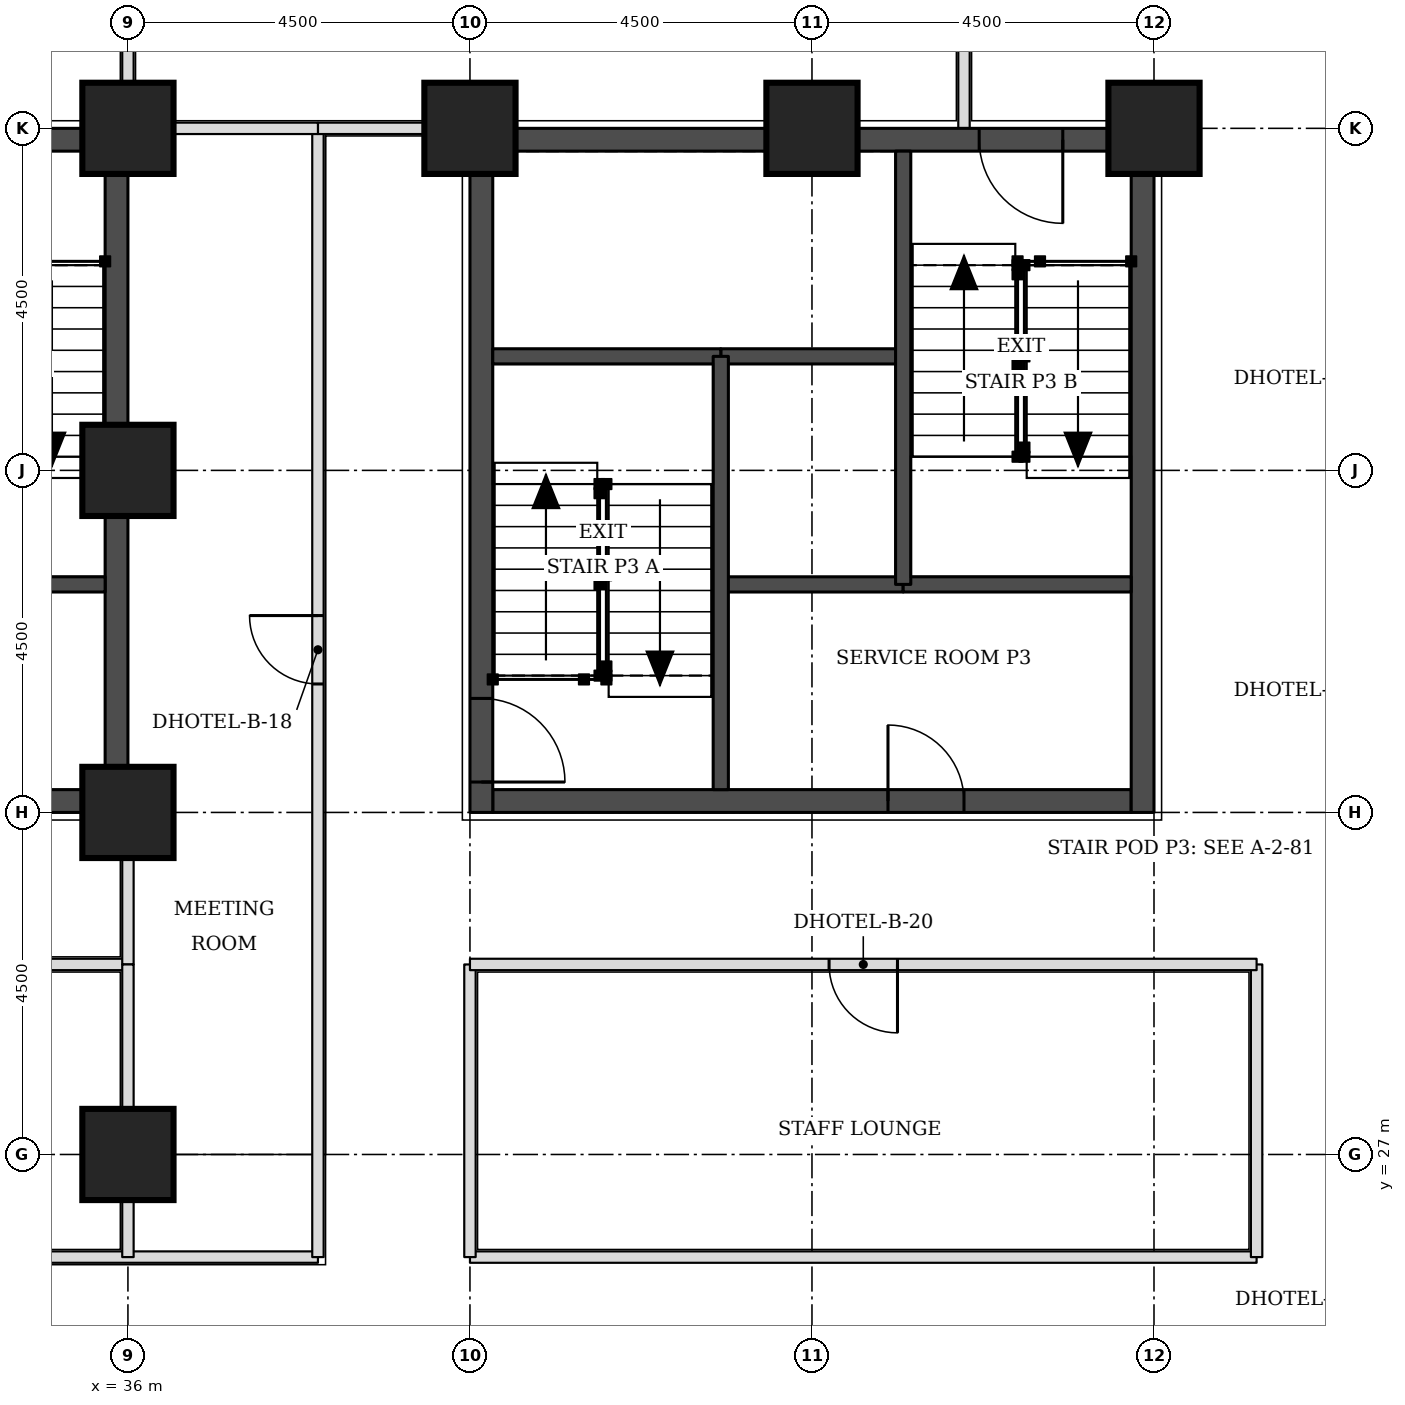
"""IFC4 building model, lengths in metres.
Left out: names, types, materials, properties, quantities, classifications, styles, units other than length and angle.
Written with IfcOpenShell. Run it as: python <this file> out.ifc"""

import sys

from ifc_helpers import new_model, si_unit, direction, frame, frame_2d, origin, origin_2d, place, context, subcontext, project, spatial, rectangle, extrude, element, fill, save


model = new_model("IFC4")
c1 = context("Model", 3, precision=1e-05, world=origin(), true_north=direction((0.0, 1.0)))
c2 = subcontext(c1, "Body", "Model", "MODEL_VIEW")
j1 = project(units=[si_unit("LENGTHUNIT", "METRE"), si_unit("PLANEANGLEUNIT", "RADIAN")], contexts=[c1])
p1 = place(None, origin())
s1 = spatial("IfcSite", under=j1, at=p1, CompositionType="ELEMENT")
p2 = place(p1, origin())
s2 = spatial("IfcBuilding", under=s1, at=p2, CompositionType="ELEMENT")
p3 = place(p2, frame((0.0, 0.0, 52.8)))
s3 = spatial("IfcBuildingStorey", under=s2, at=p3, CompositionType="ELEMENT", Elevation=52.8)
for number, where, z_axis, x_axis in (
    (1, (36.0, 27.0, 0.0), (0.0, 0.0, 1.0), (1.0, 0.0, 0.0)),
    (2, (36.0, 31.5, 0.0), (0.0, 0.0, 1.0), (1.0, 0.0, 0.0)),
    (3, (36.0, 36.0, 0.0), (0.0, 0.0, 1.0), (1.0, 0.0, 0.0)),
    (4, (36.0, 40.5, 0.0), (0.0, 0.0, 1.0), (1.0, 0.0, 0.0)),
    (5, (40.5, 40.5, 0.0), (0.0, 0.0, 1.0), (1.0, 0.0, 0.0)),
    (6, (45.0, 40.5, 0.0), (0.0, 0.0, 1.0), (1.0, 0.0, 0.0)),
    (7, (49.5, 40.5, 0.0), (0.0, 0.0, 1.0), (1.0, 0.0, 0.0)),
):
    element("IfcColumn", number, at=place(p3, frame(where, z_axis=z_axis, x_axis=x_axis)), inside=s3, PredefinedType="COLUMN", context=c2, shape_type="SweptSolid", body=[
        extrude(rectangle(XDim=1.2, YDim=1.2, at=origin_2d()), origin(), (0.0, 0.0, 1.0), 3.3),
    ])
p4 = place(p3, frame((40.8, 31.65, 0.0), z_axis=(0.0, 0.0, 1.0), x_axis=(1.0, 0.0, 0.0)))
e8 = element("IfcWall", 8, at=p4, inside=s3, PredefinedType="SHEAR", context=c2, shape_type="SweptSolid", body=[
    extrude(rectangle(XDim=8.4, YDim=0.3, at=frame_2d((4.2, 0.0))), origin(), (0.0, 0.0, 1.0), 3.3),
])
p5 = place(p4, frame((5.2, 0.0, 0.0)))
e9 = element("IfcOpeningElement", 9, at=p5, cuts=e8, PredefinedType="OPENING", context=c2, shape_type="SweptSolid", body=[
    extrude(rectangle(XDim=1.0, YDim=2.1, at=frame_2d((0.5, 1.05))), frame((0.0, 0.16, 0.0), z_axis=(0.0, -1.0, 0.0), x_axis=(1.0, 0.0, 0.0)), (0.0, 0.0, 1.0), 0.32),
])
p6 = place(p3, frame((40.8, 40.35, 0.0), z_axis=(0.0, 0.0, 1.0), x_axis=(1.0, 0.0, 0.0)))
e10 = element("IfcWall", 10, at=p6, inside=s3, PredefinedType="SHEAR", context=c2, shape_type="SweptSolid", body=[
    extrude(rectangle(XDim=8.4, YDim=0.3, at=frame_2d((4.2, 0.0))), origin(), (0.0, 0.0, 1.0), 3.3),
])
p7 = place(p6, frame((6.4, 0.0, 0.0)))
e11 = element("IfcOpeningElement", 11, at=p7, cuts=e10, PredefinedType="OPENING", context=c2, shape_type="SweptSolid", body=[
    extrude(rectangle(XDim=1.1, YDim=2.1, at=frame_2d((0.55, 1.05))), frame((0.0, 0.16, 0.0), z_axis=(0.0, -1.0, 0.0), x_axis=(1.0, 0.0, 0.0)), (0.0, 0.0, 1.0), 0.32),
])
p8 = place(p3, frame((40.65, 31.5, 0.0), z_axis=(0.0, 0.0, 1.0), x_axis=(0.0, 1.0, 0.0)))
e12 = element("IfcWall", 12, at=p8, inside=s3, PredefinedType="SHEAR", context=c2, shape_type="SweptSolid", body=[
    extrude(rectangle(XDim=9.0, YDim=0.3, at=frame_2d((4.5, 0.0))), origin(), (0.0, 0.0, 1.0), 3.3),
])
p9 = place(p8, frame((0.4, 0.0, 0.0)))
e13 = element("IfcOpeningElement", 13, at=p9, cuts=e12, PredefinedType="OPENING", context=c2, shape_type="SweptSolid", body=[
    extrude(rectangle(XDim=1.1, YDim=2.1, at=frame_2d((0.55, 1.05))), frame((0.0, 0.16, 0.0), z_axis=(0.0, -1.0, 0.0), x_axis=(1.0, 0.0, 0.0)), (0.0, 0.0, 1.0), 0.32),
])
p10 = place(p3, frame((49.35, 31.5, 0.0), z_axis=(0.0, 0.0, 1.0), x_axis=(0.0, 1.0, 0.0)))
e14 = element("IfcWall", 14, at=p10, inside=s3, PredefinedType="SHEAR", context=c2, shape_type="SweptSolid", body=[
    extrude(rectangle(XDim=9.0, YDim=0.3, at=frame_2d((4.5, 0.0))), origin(), (0.0, 0.0, 1.0), 3.3),
])
p11 = place(p3, frame((27.3, 31.65, 0.0), z_axis=(0.0, 0.0, 1.0), x_axis=(1.0, 0.0, 0.0)))
e15 = element("IfcWall", 15, at=p11, inside=s3, PredefinedType="SHEAR", context=c2, shape_type="SweptSolid", body=[
    extrude(rectangle(XDim=8.4, YDim=0.3, at=frame_2d((4.2, 0.0))), origin(), (0.0, 0.0, 1.0), 3.3),
])
p12 = place(p11, frame((4.8, 0.0, 0.0)))
e16 = element("IfcOpeningElement", 16, at=p12, cuts=e15, PredefinedType="OPENING", context=c2, shape_type="SweptSolid", body=[
    extrude(rectangle(XDim=1.8, YDim=2.1, at=frame_2d((0.9, 1.05))), frame((0.0, 0.16, 0.0), z_axis=(0.0, -1.0, 0.0), x_axis=(1.0, 0.0, 0.0)), (0.0, 0.0, 1.0), 0.32),
])
p13 = place(p3, frame((27.3, 40.35, 0.0), z_axis=(0.0, 0.0, 1.0), x_axis=(1.0, 0.0, 0.0)))
e17 = element("IfcWall", 17, at=p13, inside=s3, PredefinedType="SHEAR", context=c2, shape_type="SweptSolid", body=[
    extrude(rectangle(XDim=8.4, YDim=0.3, at=frame_2d((4.2, 0.0))), origin(), (0.0, 0.0, 1.0), 3.3),
])
p14 = place(p13, frame((6.4, 0.0, 0.0)))
e18 = element("IfcOpeningElement", 18, at=p14, cuts=e17, PredefinedType="OPENING", context=c2, shape_type="SweptSolid", body=[
    extrude(rectangle(XDim=1.1, YDim=2.1, at=frame_2d((0.55, 1.05))), frame((0.0, 0.16, 0.0), z_axis=(0.0, -1.0, 0.0), x_axis=(1.0, 0.0, 0.0)), (0.0, 0.0, 1.0), 0.32),
])
p15 = place(p3, frame((35.85, 31.5, 0.0), z_axis=(0.0, 0.0, 1.0), x_axis=(0.0, 1.0, 0.0)))
e19 = element("IfcWall", 19, at=p15, inside=s3, PredefinedType="SHEAR", context=c2, shape_type="SweptSolid", body=[
    extrude(rectangle(XDim=9.0, YDim=0.3, at=frame_2d((4.5, 0.0))), origin(), (0.0, 0.0, 1.0), 3.3),
])
p16 = place(p3, frame((27.0, 25.65, 0.0), z_axis=(0.0, 0.0, 1.0), x_axis=(1.0, 0.0, 0.0)))
e20 = element("IfcWall", 20, at=p16, inside=s3, PredefinedType="PARTITIONING", context=c2, shape_type="SweptSolid", body=[
    extrude(rectangle(XDim=11.5, YDim=0.15, at=frame_2d((5.75, 0.0))), origin(), (0.0, 0.0, 1.0), 3.08),
])
p17 = place(p3, frame((38.5, 25.65, 0.0), z_axis=(0.0, 0.0, 1.0), x_axis=(0.0, 1.0, 0.0)))
e21 = element("IfcWall", 21, at=p17, inside=s3, PredefinedType="PARTITIONING", context=c2, shape_type="SweptSolid", body=[
    extrude(rectangle(XDim=14.85, YDim=0.15, at=frame_2d((7.425, 0.0))), origin(), (0.0, 0.0, 1.0), 3.08),
])
p18 = place(p17, frame((7.54, 0.0, 0.0)))
e22 = element("IfcOpeningElement", 22, at=p18, cuts=e21, PredefinedType="OPENING", context=c2, shape_type="SweptSolid", body=[
    extrude(rectangle(XDim=0.9, YDim=2.1, at=frame_2d((0.45, 1.05))), frame((0.0, 0.085, 0.0), z_axis=(0.0, -1.0, 0.0), x_axis=(1.0, 0.0, 0.0)), (0.0, 0.0, 1.0), 0.17),
])
p19 = place(p3, frame((40.5, 25.65, 0.0), z_axis=(0.0, 0.0, 1.0), x_axis=(1.0, 0.0, 0.0)))
e23 = element("IfcWall", 23, at=p19, inside=s3, PredefinedType="PARTITIONING", context=c2, shape_type="SweptSolid", body=[
    extrude(rectangle(XDim=10.35, YDim=0.15, at=frame_2d((5.175, 0.0))), origin(), (0.0, 0.0, 1.0), 3.08),
])
for number, where, z_axis, x_axis in (
    (24, (40.5, 25.65, 0.0), (0.0, 0.0, 1.0), (0.0, 1.0, 0.0)),
    (25, (50.85, 25.65, 0.0), (0.0, 0.0, 1.0), (0.0, 1.0, 0.0)),
):
    element("IfcWall", number, at=place(p3, frame(where, z_axis=z_axis, x_axis=x_axis)), inside=s3, PredefinedType="PARTITIONING", context=c2, shape_type="SweptSolid", body=[
        extrude(rectangle(XDim=3.85, YDim=0.15, at=frame_2d((1.925, 0.0))), origin(), (0.0, 0.0, 1.0), 3.08),
    ])
p20 = place(p3, frame((27.0, 29.5, 0.0), z_axis=(0.0, 0.0, 1.0), x_axis=(1.0, 0.0, 0.0)))
e26 = element("IfcWall", 26, at=p20, inside=s3, PredefinedType="PARTITIONING", context=c2, shape_type="SweptSolid", body=[
    extrude(rectangle(XDim=9.0, YDim=0.15, at=frame_2d((4.5, 0.0))), origin(), (0.0, 0.0, 1.0), 3.08),
])
p21 = place(p20, frame((4.05, 0.0, 0.0)))
e27 = element("IfcOpeningElement", 27, at=p21, cuts=e26, PredefinedType="OPENING", context=c2, shape_type="SweptSolid", body=[
    extrude(rectangle(XDim=0.9, YDim=2.1, at=frame_2d((0.45, 1.05))), frame((0.0, 0.085, 0.0), z_axis=(0.0, -1.0, 0.0), x_axis=(1.0, 0.0, 0.0)), (0.0, 0.0, 1.0), 0.17),
])
p22 = place(p3, frame((36.0, 29.5, 0.0), z_axis=(0.0, 0.0, 1.0), x_axis=(0.0, 1.0, 0.0)))
e28 = element("IfcWall", 28, at=p22, inside=s3, PredefinedType="PARTITIONING", context=c2, shape_type="SweptSolid", body=[
    extrude(rectangle(XDim=1.95, YDim=0.15, at=frame_2d((0.975, 0.0))), origin(), (0.0, 0.0, 1.0), 2.33),
])
p23 = place(p3, frame((40.5, 29.5, 0.0), z_axis=(0.0, 0.0, 1.0), x_axis=(1.0, 0.0, 0.0)))
e29 = element("IfcWall", 29, at=p23, inside=s3, PredefinedType="PARTITIONING", context=c2, shape_type="SweptSolid", body=[
    extrude(rectangle(XDim=10.35, YDim=0.15, at=frame_2d((5.175, 0.0))), origin(), (0.0, 0.0, 1.0), 3.08),
])
p24 = place(p23, frame((4.725, 0.0, 0.0)))
e30 = element("IfcOpeningElement", 30, at=p24, cuts=e29, PredefinedType="OPENING", context=c2, shape_type="SweptSolid", body=[
    extrude(rectangle(XDim=0.9, YDim=2.1, at=frame_2d((0.45, 1.05))), frame((0.0, 0.085, 0.0), z_axis=(0.0, -1.0, 0.0), x_axis=(1.0, 0.0, 0.0)), (0.0, 0.0, 1.0), 0.17),
])
p25 = place(p3, frame((38.5, 40.5, 0.0), z_axis=(0.0, 0.0, 1.0), x_axis=(1.0, 0.0, 0.0)))
e31 = element("IfcWall", 31, at=p25, inside=s3, PredefinedType="PARTITIONING", context=c2, shape_type="SweptSolid", body=[
    extrude(rectangle(XDim=1.95, YDim=0.15, at=frame_2d((0.975, 0.0))), origin(), (0.0, 0.0, 1.0), 2.33),
])
p26 = place(p3, frame((36.0, 40.55, 0.0), z_axis=(0.0, 0.0, 1.0), x_axis=(0.0, 1.0, 0.0)))
e32 = element("IfcWall", 32, at=p26, inside=s3, PredefinedType="PARTITIONING", context=c2, shape_type="SweptSolid", body=[
    extrude(rectangle(XDim=4.4, YDim=0.15, at=frame_2d((2.2, 0.0))), origin(), (0.0, 0.0, 1.0), 2.33),
])
p27 = place(p3, frame((47.0, 40.5, 0.0), z_axis=(0.0, 0.0, 1.0), x_axis=(0.0, 1.0, 0.0)))
e33 = element("IfcWall", 33, at=p27, inside=s3, PredefinedType="PARTITIONING", context=c2, shape_type="SweptSolid", body=[
    extrude(rectangle(XDim=7.0, YDim=0.15, at=frame_2d((3.5, 0.0))), origin(), (0.0, 0.0, 1.0), 3.08),
])
p28 = place(p27, frame((3.05, 0.0, 0.0)))
e34 = element("IfcOpeningElement", 34, at=p28, cuts=e33, PredefinedType="OPENING", context=c2, shape_type="SweptSolid", body=[
    extrude(rectangle(XDim=0.9, YDim=2.1, at=frame_2d((0.45, 1.05))), frame((0.0, 0.085, 0.0), z_axis=(0.0, -1.0, 0.0), x_axis=(1.0, 0.0, 0.0)), (0.0, 0.0, 1.0), 0.17),
])
p29 = place(p3, frame((36.0, 25.65, 0.0), z_axis=(0.0, 0.0, 1.0), x_axis=(0.0, 1.0, 0.0)))
e35 = element("IfcWall", 35, at=p29, inside=s3, PredefinedType="PARTITIONING", context=c2, shape_type="SweptSolid", body=[
    extrude(rectangle(XDim=3.85, YDim=0.15, at=frame_2d((1.925, 0.0))), origin(), (0.0, 0.0, 1.0), 2.33),
])
p30 = place(p3, frame((36.05, 40.5, 0.0), z_axis=(0.0, 0.0, 1.0), x_axis=(1.0, 0.0, 0.0)))
e36 = element("IfcWall", 36, at=p30, inside=s3, PredefinedType="PARTITIONING", context=c2, shape_type="SweptSolid", body=[
    extrude(rectangle(XDim=2.45, YDim=0.15, at=frame_2d((1.225, 0.0))), origin(), (0.0, 0.0, 1.0), 2.33),
])
p31 = place(p3, frame((43.8, 34.5, 0.0), z_axis=(0.0, 0.0, 1.0), x_axis=(1.0, 0.0, 0.0)))
e37 = element("IfcWall", 37, at=p31, inside=s3, PredefinedType="SOLIDWALL", context=c2, shape_type="SweptSolid", body=[
    extrude(rectangle(XDim=2.4, YDim=0.2, at=frame_2d((1.2, 0.0))), origin(), (0.0, 0.0, 1.0), 3.08),
])
p32 = place(p3, frame((46.2, 34.5, 0.0), z_axis=(0.0, 0.0, 1.0), x_axis=(1.0, 0.0, 0.0)))
e38 = element("IfcWall", 38, at=p32, inside=s3, PredefinedType="SOLIDWALL", context=c2, shape_type="SweptSolid", body=[
    extrude(rectangle(XDim=3.0, YDim=0.2, at=frame_2d((1.5, 0.0))), origin(), (0.0, 0.0, 1.0), 3.08),
])
p33 = place(p3, frame((43.8, 37.5, 0.0), z_axis=(0.0, 0.0, 1.0), x_axis=(1.0, 0.0, 0.0)))
e39 = element("IfcWall", 39, at=p33, inside=s3, PredefinedType="SOLIDWALL", context=c2, shape_type="SweptSolid", body=[
    extrude(rectangle(XDim=2.4, YDim=0.2, at=frame_2d((1.2, 0.0))), origin(), (0.0, 0.0, 1.0), 3.3),
])
p34 = place(p3, frame((40.8, 37.5, 0.0), z_axis=(0.0, 0.0, 1.0), x_axis=(1.0, 0.0, 0.0)))
e40 = element("IfcWall", 40, at=p34, inside=s3, PredefinedType="SOLIDWALL", context=c2, shape_type="SweptSolid", body=[
    extrude(rectangle(XDim=3.0, YDim=0.2, at=frame_2d((1.5, 0.0))), origin(), (0.0, 0.0, 1.0), 3.08),
])
for number, where, z_axis, x_axis in (
    (41, (43.8, 31.8, 0.0), (0.0, 0.0, 1.0), (0.0, 1.0, 0.0)),
    (42, (46.2, 34.5, 0.0), (0.0, 0.0, 1.0), (0.0, 1.0, 0.0)),
):
    element("IfcWall", number, at=place(p3, frame(where, z_axis=z_axis, x_axis=x_axis)), inside=s3, PredefinedType="SOLIDWALL", context=c2, shape_type="SweptSolid", body=[
        extrude(rectangle(XDim=5.7, YDim=0.2, at=frame_2d((2.85, 0.0))), origin(), (0.0, 0.0, 1.0), 3.08),
    ])
p35 = place(p3, frame((30.3, 34.5, 0.0), z_axis=(0.0, 0.0, 1.0), x_axis=(1.0, 0.0, 0.0)))
e43 = element("IfcWall", 43, at=p35, inside=s3, PredefinedType="SOLIDWALL", context=c2, shape_type="SweptSolid", body=[
    extrude(rectangle(XDim=5.4, YDim=0.2, at=frame_2d((2.7, 0.0))), origin(), (0.0, 0.0, 1.0), 3.08),
])
p36 = place(p35, frame((0.45, 0.0, 0.0)))
e44 = element("IfcOpeningElement", 44, at=p36, cuts=e43, PredefinedType="OPENING", context=c2, shape_type="SweptSolid", body=[
    extrude(rectangle(XDim=1.5, YDim=2.1, at=frame_2d((0.75, 1.05))), frame((0.0, 0.11, 0.0), z_axis=(0.0, -1.0, 0.0), x_axis=(1.0, 0.0, 0.0)), (0.0, 0.0, 1.0), 0.22),
])
p37 = place(p24, frame((0.9, 0.0, 0.0), z_axis=(0.0, 0.0, 1.0), x_axis=(-1.0, 0.0, 0.0)))
e45 = element("IfcDoor", 45, at=p37, inside=s3, OperationType="SINGLE_SWING_LEFT", PredefinedType="DOOR", context=c2, shape_type="SweptSolid", body=[
    extrude(rectangle(XDim=0.9, YDim=2.1, at=frame_2d((0.45, 1.05))), frame((0.0, 0.025, 0.0), z_axis=(0.0, -1.0, 0.0), x_axis=(1.0, 0.0, 0.0)), (0.0, 0.0, 1.0), 0.05),
])
fill(e30, e45)
p38 = place(p18, origin())
e46 = element("IfcDoor", 46, at=p38, inside=s3, OperationType="SINGLE_SWING_RIGHT", PredefinedType="DOOR", context=c2, shape_type="SweptSolid", body=[
    extrude(rectangle(XDim=0.9, YDim=2.1, at=frame_2d((0.45, 1.05))), frame((0.0, 0.025, 0.0), z_axis=(0.0, -1.0, 0.0), x_axis=(1.0, 0.0, 0.0)), (0.0, 0.0, 1.0), 0.05),
])
fill(e22, e46)
p39 = place(p9, frame((1.1, 0.0, 0.0), z_axis=(0.0, 0.0, 1.0), x_axis=(-1.0, 0.0, 0.0)))
e47 = element("IfcDoor", 47, at=p39, inside=s3, OperationType="SINGLE_SWING_RIGHT", PredefinedType="DOOR", context=c2, shape_type="SweptSolid", body=[
    extrude(rectangle(XDim=1.1, YDim=2.1, at=frame_2d((0.55, 1.05))), frame((0.0, 0.025, 0.0), z_axis=(0.0, -1.0, 0.0), x_axis=(1.0, 0.0, 0.0)), (0.0, 0.0, 1.0), 0.05),
])
fill(e13, e47)
p40 = place(p7, frame((1.1, 0.0, 0.0), z_axis=(0.0, 0.0, 1.0), x_axis=(-1.0, 0.0, 0.0)))
e48 = element("IfcDoor", 48, at=p40, inside=s3, OperationType="SINGLE_SWING_LEFT", PredefinedType="DOOR", context=c2, shape_type="SweptSolid", body=[
    extrude(rectangle(XDim=1.1, YDim=2.1, at=frame_2d((0.55, 1.05))), frame((0.0, 0.025, 0.0), z_axis=(0.0, -1.0, 0.0), x_axis=(1.0, 0.0, 0.0)), (0.0, 0.0, 1.0), 0.05),
])
fill(e11, e48)
p41 = place(p5, origin())
e49 = element("IfcDoor", 49, at=p41, inside=s3, OperationType="SINGLE_SWING_LEFT", PredefinedType="DOOR", context=c2, shape_type="SweptSolid", body=[
    extrude(rectangle(XDim=1.0, YDim=2.1, at=frame_2d((0.5, 1.05))), frame((0.0, 0.025, 0.0), z_axis=(0.0, -1.0, 0.0), x_axis=(1.0, 0.0, 0.0)), (0.0, 0.0, 1.0), 0.05),
])
fill(e9, e49)
save(model, sys.argv[1])
